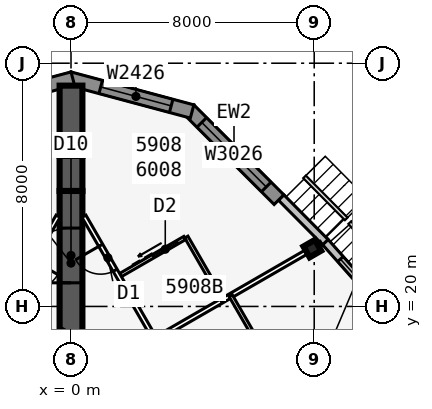
"""IFC4 building model, lengths in metres.
Left out: names, types, materials, properties, quantities, classifications, styles, units other than length and angle.
Written with IfcOpenShell. Run it as: python <this file> out.ifc"""

import sys

from ifc_helpers import new_model, si_unit, direction, frame, frame_2d, origin, origin_2d, place, context, subcontext, project, spatial, polyline, rectangle, i_section, outline, extrude, element, fill, save


model = new_model("IFC4")
c1 = context("Model", 3, precision=1e-05, world=origin(), true_north=direction((0.0, 1.0)))
c2 = subcontext(c1, "Body", "Model", "MODEL_VIEW")
j1 = project(units=[si_unit("LENGTHUNIT", "METRE"), si_unit("PLANEANGLEUNIT", "RADIAN")], contexts=[c1])
p1 = place(None, origin())
s1 = spatial("IfcSite", under=j1, at=p1, CompositionType="ELEMENT")
p2 = place(p1, origin())
s2 = spatial("IfcBuilding", under=s1, at=p2, CompositionType="ELEMENT")
p3 = place(p2, frame((0.0, 0.0, 222.5)))
s3 = spatial("IfcBuildingStorey", under=s2, at=p3, CompositionType="ELEMENT", Elevation=222.5)
p4 = place(p3, frame((16.5, -9.526, 0.0), z_axis=(0.0, 0.0, 1.0), x_axis=(-0.499999749417, 0.866025548458, 0.0)))
e1 = element("IfcWall", 1, at=p4, inside=s3, PredefinedType="SHEAR", context=c2, shape_type="SweptSolid", body=[
    extrude(rectangle(XDim=33.0, YDim=0.75, at=frame_2d((16.5, 0.0))), origin(), (0.0, 0.0, 1.0), 3.6),
])
p5 = place(p4, frame((14.15, 0.0, 0.0)))
e2 = element("IfcOpeningElement", 2, at=p5, cuts=e1, PredefinedType="OPENING", context=c2, shape_type="SweptSolid", body=[
    extrude(rectangle(XDim=1.8, YDim=2.13, at=frame_2d((0.9, 1.065))), frame((0.0, 0.385, 0.0), z_axis=(0.0, -1.0, 0.0), x_axis=(1.0, 0.0, 0.0)), (0.0, 0.0, 1.0), 0.77),
])
p6 = place(p4, frame((12.6, 0.0, 0.0)))
e3 = element("IfcOpeningElement", 3, at=p6, cuts=e1, PredefinedType="OPENING", context=c2, shape_type="SweptSolid", body=[
    extrude(rectangle(XDim=1.0, YDim=2.13, at=frame_2d((0.5, 1.065))), frame((0.0, 0.385, 0.0), z_axis=(0.0, -1.0, 0.0), x_axis=(1.0, 0.0, 0.0)), (0.0, 0.0, 1.0), 0.77),
])
p7 = place(p3, frame((0.0, 19.052, 0.0), z_axis=(0.0, 0.0, 1.0), x_axis=(-0.499999749417, -0.866025548458, 0.0)))
e4 = element("IfcWall", 4, at=p7, inside=s3, PredefinedType="SHEAR", context=c2, shape_type="SweptSolid", body=[
    extrude(rectangle(XDim=33.0, YDim=0.75, at=frame_2d((16.5, 0.0))), origin(), (0.0, 0.0, 1.0), 3.6),
])
p8 = place(p7, frame((14.15, 0.0, 0.0)))
e5 = element("IfcOpeningElement", 5, at=p8, cuts=e4, PredefinedType="OPENING", context=c2, shape_type="SweptSolid", body=[
    extrude(rectangle(XDim=1.8, YDim=2.13, at=frame_2d((0.9, 1.065))), frame((0.0, 0.385, 0.0), z_axis=(0.0, -1.0, 0.0), x_axis=(1.0, 0.0, 0.0)), (0.0, 0.0, 1.0), 0.77),
])
p9 = place(p7, frame((12.6, 0.0, 0.0)))
e6 = element("IfcOpeningElement", 6, at=p9, cuts=e4, PredefinedType="OPENING", context=c2, shape_type="SweptSolid", body=[
    extrude(rectangle(XDim=1.0, YDim=2.13, at=frame_2d((0.5, 1.065))), frame((0.0, 0.385, 0.0), z_axis=(0.0, -1.0, 0.0), x_axis=(1.0, 0.0, 0.0)), (0.0, 0.0, 1.0), 0.77),
])
p10 = place(p3, frame((0.0, 19.052, 0.0), z_axis=(0.0, 0.0, 1.0), x_axis=(0.0, 1.0, 0.0)))
e7 = element("IfcWall", 7, at=p10, inside=s3, PredefinedType="SHEAR", context=c2, shape_type="SweptSolid", body=[
    extrude(rectangle(XDim=4.746, YDim=0.75, at=frame_2d((2.373, 0.0))), origin(), (0.0, 0.0, 1.0), 3.6),
])
p11 = place(p10, frame((1.725, 0.0, 0.0)))
e8 = element("IfcOpeningElement", 8, at=p11, cuts=e7, PredefinedType="OPENING", context=c2, shape_type="SweptSolid", body=[
    extrude(rectangle(XDim=1.8, YDim=2.13, at=frame_2d((0.9, 1.065))), frame((0.0, 0.385, 0.0), z_axis=(0.0, -1.0, 0.0), x_axis=(1.0, 0.0, 0.0)), (0.0, 0.0, 1.0), 0.77),
])
p12 = place(p3, frame((0.0, 23.799, 0.0), z_axis=(0.0, 0.0, 1.0), x_axis=(0.0, 1.0, 0.0)))
e9 = element("IfcWall", 9, at=p12, inside=s3, PredefinedType="SHEAR", context=c2, shape_type="SweptSolid", body=[
    extrude(rectangle(XDim=1.155, YDim=0.75, at=frame_2d((0.577, 0.0))), origin(), (0.0, 0.0, 1.0), 3.6),
])
p13 = place(p3, frame((0.0, 24.953, 0.0), z_axis=(0.0, 0.0, 1.0), x_axis=(0.0, 1.0, 0.0)))
e10 = element("IfcWall", 10, at=p13, inside=s3, PredefinedType="SHEAR", context=c2, shape_type="SweptSolid", body=[
    extrude(rectangle(XDim=2.309, YDim=0.75, at=frame_2d((1.155, 0.0))), origin(), (0.0, 0.0, 1.0), 3.6),
])
p14 = place(p3, frame((7.937, 21.903, 0.0), z_axis=(0.0, 0.0, 1.0), x_axis=(-0.5, 0.866025403784, 0.0)))
e11 = element("IfcColumn", 11, at=p14, inside=s3, PredefinedType="COLUMN", context=c2, shape_type="SweptSolid", body=[
    extrude(i_section(OverallWidth=0.411, OverallDepth=0.434, WebThickness=0.036, FlangeThickness=0.057, at=origin_2d()), origin(), (0.0, 0.0, 1.0), 3.6),
])
p15 = place(p3, frame((11.754, 18.304, 0.0), z_axis=(0.0, 0.0, 1.0), x_axis=(-0.664348996191, 0.747422511876, 0.0)))
e12 = element("IfcWall", 12, at=p15, inside=s3, PredefinedType="STANDARD", context=c2, shape_type="SweptSolid", body=[
    extrude(rectangle(XDim=5.105, YDim=0.25, at=frame_2d((2.552, 0.0))), origin(), (0.0, 0.0, 1.0), 3.435),
])
p16 = place(p15, frame((0.752, 0.0, 0.45)))
e13 = element("IfcOpeningElement", 13, at=p16, cuts=e12, PredefinedType="OPENING", context=c2, shape_type="SweptSolid", body=[
    extrude(rectangle(XDim=3.6, YDim=2.6, at=frame_2d((1.8, 1.3))), frame((0.0, 0.135, 0.0), z_axis=(0.0, -1.0, 0.0), x_axis=(1.0, 0.0, 0.0)), (0.0, 0.0, 1.0), 0.27),
])
p17 = place(p3, frame((8.368, 22.115, 0.0), z_axis=(0.0, 0.0, 1.0), x_axis=(-0.704149946111, 0.710051303352, 0.0)))
e14 = element("IfcWall", 14, at=p17, inside=s3, PredefinedType="STANDARD", context=c2, shape_type="SweptSolid", body=[
    extrude(rectangle(XDim=2.069, YDim=0.25, at=frame_2d((1.034, 0.0))), origin(), (0.0, 0.0, 1.0), 3.435),
])
p18 = place(p3, frame((6.841, 23.512, 0.0), z_axis=(0.0, 0.0, 1.0), x_axis=(-0.707106781187, 0.707106781187, 0.0)))
e15 = element("IfcWall", 15, at=p18, inside=s3, PredefinedType="SOLIDWALL", context=c2, shape_type="SweptSolid", body=[
    extrude(rectangle(XDim=4.184, YDim=0.45, at=frame_2d((2.092, 0.0))), origin(), (0.0, 0.0, 1.0), 3.435),
])
p19 = place(p18, frame((0.592, 0.0, 0.45)))
e16 = element("IfcOpeningElement", 16, at=p19, cuts=e15, PredefinedType="OPENING", context=c2, shape_type="SweptSolid", body=[
    extrude(rectangle(XDim=3.0, YDim=2.6, at=frame_2d((1.5, 1.3))), frame((0.0, 0.235, 0.0), z_axis=(0.0, -1.0, 0.0), x_axis=(1.0, 0.0, 0.0)), (0.0, 0.0, 1.0), 0.47),
])
p20 = place(p3, frame((3.983, 26.413, 0.0), z_axis=(0.0, 0.0, 1.0), x_axis=(-0.965920442324, 0.258839137498, 0.0)))
e17 = element("IfcWall", 17, at=p20, inside=s3, PredefinedType="SOLIDWALL", context=c2, shape_type="SweptSolid", body=[
    extrude(outline(polyline([(4.184, 0.225), (4.124, 0.225), (3.706, 0.113), (3.676, 0.225), (0.0, 0.225), (0.0, -0.225), (4.184, -0.225), (4.184, 0.225)])), origin(), (0.0, 0.0, 1.0), 3.435),
])
p21 = place(p20, frame((0.713, 0.0, 0.45)))
e18 = element("IfcOpeningElement", 18, at=p21, cuts=e17, PredefinedType="OPENING", context=c2, shape_type="SweptSolid", body=[
    extrude(rectangle(XDim=2.4, YDim=2.6, at=frame_2d((1.2, 1.3))), frame((0.0, 0.235, 0.0), z_axis=(0.0, -1.0, 0.0), x_axis=(1.0, 0.0, 0.0)), (0.0, 0.0, 1.0), 0.47),
])
p22 = place(p3, frame((0.058, 27.496, 0.0), z_axis=(0.0, 0.0, 1.0), x_axis=(-0.965920442324, -0.258839137498, 0.0)))
e19 = element("IfcWall", 19, at=p22, inside=s3, PredefinedType="SOLIDWALL", context=c2, shape_type="SweptSolid", body=[
    extrude(outline(polyline([(4.184, 0.225), (0.509, 0.225), (0.479, 0.113), (0.06, 0.225), (0.0, 0.225), (0.0, -0.225), (4.184, -0.225), (4.184, 0.225)])), origin(), (0.0, 0.0, 1.0), 3.435),
])
p23 = place(p22, frame((1.071, 0.0, 0.45)))
e20 = element("IfcOpeningElement", 20, at=p23, cuts=e19, PredefinedType="OPENING", context=c2, shape_type="SweptSolid", body=[
    extrude(rectangle(XDim=2.4, YDim=2.6, at=frame_2d((1.2, 1.3))), frame((0.0, 0.235, 0.0), z_axis=(0.0, -1.0, 0.0), x_axis=(1.0, 0.0, 0.0)), (0.0, 0.0, 1.0), 0.47),
])
p24 = place(p3, frame((20.102, -11.115, 0.0), z_axis=(0.0, 0.0, 1.0), x_axis=(-0.500000265775, 0.866025250339, 0.0)))
e21 = element("IfcWall", 21, at=p24, inside=s3, PredefinedType="PARTITIONING", context=c2, shape_type="SweptSolid", body=[
    extrude(rectangle(XDim=39.354, YDim=0.15, at=frame_2d((19.677, 0.0))), origin(), (0.0, 0.0, 1.0), 3.435),
])
p25 = place(p24, frame((1.102, 0.0, 0.0)))
e22 = element("IfcOpeningElement", 22, at=p25, cuts=e21, PredefinedType="OPENING", context=c2, shape_type="SweptSolid", body=[
    extrude(rectangle(XDim=0.95, YDim=2.13, at=frame_2d((0.475, 1.065))), frame((0.0, 0.085, 0.0), z_axis=(0.0, -1.0, 0.0), x_axis=(1.0, 0.0, 0.0)), (0.0, 0.0, 1.0), 0.17),
])
p26 = place(p24, frame((11.702, 0.0, 0.0)))
e23 = element("IfcOpeningElement", 23, at=p26, cuts=e21, PredefinedType="OPENING", context=c2, shape_type="SweptSolid", body=[
    extrude(rectangle(XDim=0.95, YDim=2.13, at=frame_2d((0.475, 1.065))), frame((0.0, 0.085, 0.0), z_axis=(0.0, -1.0, 0.0), x_axis=(1.0, 0.0, 0.0)), (0.0, 0.0, 1.0), 0.17),
])
p27 = place(p24, frame((26.702, 0.0, 0.0)))
e24 = element("IfcOpeningElement", 24, at=p27, cuts=e21, PredefinedType="OPENING", context=c2, shape_type="SweptSolid", body=[
    extrude(rectangle(XDim=0.95, YDim=2.13, at=frame_2d((0.475, 1.065))), frame((0.0, 0.085, 0.0), z_axis=(0.0, -1.0, 0.0), x_axis=(1.0, 0.0, 0.0)), (0.0, 0.0, 1.0), 0.17),
])
p28 = place(p24, frame((37.302, 0.0, 0.0)))
e25 = element("IfcOpeningElement", 25, at=p28, cuts=e21, PredefinedType="OPENING", context=c2, shape_type="SweptSolid", body=[
    extrude(rectangle(XDim=0.95, YDim=2.13, at=frame_2d((0.475, 1.065))), frame((0.0, 0.085, 0.0), z_axis=(0.0, -1.0, 0.0), x_axis=(1.0, 0.0, 0.0)), (0.0, 0.0, 1.0), 0.17),
])
p29 = place(p3, frame((2.829, 18.954, 0.0), z_axis=(0.0, 0.0, 1.0), x_axis=(0.866026604282, 0.499997920671, 0.0)))
e26 = element("IfcWall", 26, at=p29, inside=s3, PredefinedType="PARTITIONING", context=c2, shape_type="SweptSolid", body=[
    extrude(rectangle(XDim=6.24, YDim=0.15, at=frame_2d((3.12, 0.0))), origin(), (0.0, 0.0, 1.0), 2.589),
])
p30 = place(p3, frame((6.753, 17.755, 0.0), z_axis=(0.0, 0.0, 1.0), x_axis=(-0.499990139034, 0.866031096941, 0.0)))
e27 = element("IfcWall", 27, at=p30, inside=s3, PredefinedType="PLUMBINGWALL", context=c2, shape_type="SweptSolid", body=[
    extrude(rectangle(XDim=3.0, YDim=0.12, at=frame_2d((1.5, 0.0))), origin(), (0.0, 0.0, 1.0), 3.435),
])
p31 = place(p3, frame((4.993, 20.204, 0.0), z_axis=(0.0, 0.0, 1.0), x_axis=(-0.500001309137, 0.866024647952, 0.0)))
e28 = element("IfcWall", 28, at=p31, inside=s3, PredefinedType="PLUMBINGWALL", context=c2, shape_type="SweptSolid", body=[
    extrude(rectangle(XDim=2.4, YDim=0.12, at=frame_2d((1.2, 0.0))), origin(), (0.0, 0.0, 1.0), 3.435),
])
p32 = place(p3, frame((1.628, 21.032, 0.0), z_axis=(0.0, 0.0, 1.0), x_axis=(0.866048967903, 0.499959183527, 0.0)))
e29 = element("IfcWall", 29, at=p32, inside=s3, PredefinedType="PLUMBINGWALL", context=c2, shape_type="SweptSolid", body=[
    extrude(rectangle(XDim=2.44, YDim=0.12, at=frame_2d((1.22, 0.0))), origin(), (0.0, 0.0, 1.0), 3.435),
])
p33 = place(p32, frame((1.25, 0.0, 0.0)))
e30 = element("IfcOpeningElement", 30, at=p33, cuts=e29, PredefinedType="OPENING", context=c2, shape_type="SweptSolid", body=[
    extrude(rectangle(XDim=0.9, YDim=2.13, at=frame_2d((0.45, 1.065))), frame((0.0, 0.07, 0.0), z_axis=(0.0, -1.0, 0.0), x_axis=(1.0, 0.0, 0.0)), (0.0, 0.0, 1.0), 0.14),
])
p34 = place(p3, frame((-0.425, 22.966, 0.0), z_axis=(0.0, 0.0, 1.0), x_axis=(-0.500000265775, -0.866025250339, 0.0)))
e31 = element("IfcWall", 31, at=p34, inside=s3, PredefinedType="PARTITIONING", context=c2, shape_type="SweptSolid", body=[
    extrude(rectangle(XDim=39.354, YDim=0.15, at=frame_2d((19.677, 0.0))), origin(), (0.0, 0.0, 1.0), 3.435),
])
p35 = place(p34, frame((1.665, 0.0, 0.0)))
e32 = element("IfcOpeningElement", 32, at=p35, cuts=e31, PredefinedType="OPENING", context=c2, shape_type="SweptSolid", body=[
    extrude(rectangle(XDim=0.95, YDim=2.13, at=frame_2d((0.475, 1.065))), frame((0.0, 0.085, 0.0), z_axis=(0.0, -1.0, 0.0), x_axis=(1.0, 0.0, 0.0)), (0.0, 0.0, 1.0), 0.17),
])
p36 = place(p34, frame((11.702, 0.0, 0.0)))
e33 = element("IfcOpeningElement", 33, at=p36, cuts=e31, PredefinedType="OPENING", context=c2, shape_type="SweptSolid", body=[
    extrude(rectangle(XDim=0.95, YDim=2.13, at=frame_2d((0.475, 1.065))), frame((0.0, 0.085, 0.0), z_axis=(0.0, -1.0, 0.0), x_axis=(1.0, 0.0, 0.0)), (0.0, 0.0, 1.0), 0.17),
])
p37 = place(p34, frame((21.702, 0.0, 0.0)))
e34 = element("IfcOpeningElement", 34, at=p37, cuts=e31, PredefinedType="OPENING", context=c2, shape_type="SweptSolid", body=[
    extrude(rectangle(XDim=0.95, YDim=2.13, at=frame_2d((0.475, 1.065))), frame((0.0, 0.085, 0.0), z_axis=(0.0, -1.0, 0.0), x_axis=(1.0, 0.0, 0.0)), (0.0, 0.0, 1.0), 0.17),
])
p38 = place(p34, frame((36.739, 0.0, 0.0)))
e35 = element("IfcOpeningElement", 35, at=p38, cuts=e31, PredefinedType="OPENING", context=c2, shape_type="SweptSolid", body=[
    extrude(rectangle(XDim=0.95, YDim=2.13, at=frame_2d((0.475, 1.065))), frame((0.0, 0.085, 0.0), z_axis=(0.0, -1.0, 0.0), x_axis=(1.0, 0.0, 0.0)), (0.0, 0.0, 1.0), 0.17),
])
p39 = place(p16, origin())
e36 = element("IfcWindow", 36, at=p39, inside=s3, PartitioningType="SINGLE_PANEL", PredefinedType="WINDOW", context=c2, shape_type="SweptSolid", body=[
    extrude(rectangle(XDim=3.6, YDim=2.6, at=frame_2d((1.8, 1.3))), frame((0.0, 0.03, 0.0), z_axis=(0.0, -1.0, 0.0), x_axis=(1.0, 0.0, 0.0)), (0.0, 0.0, 1.0), 0.06),
])
fill(e13, e36)
p40 = place(p19, origin())
e37 = element("IfcWindow", 37, at=p40, inside=s3, PartitioningType="SINGLE_PANEL", PredefinedType="WINDOW", context=c2, shape_type="SweptSolid", body=[
    extrude(rectangle(XDim=3.0, YDim=2.6, at=frame_2d((1.5, 1.3))), frame((0.0, 0.03, 0.0), z_axis=(0.0, -1.0, 0.0), x_axis=(1.0, 0.0, 0.0)), (0.0, 0.0, 1.0), 0.06),
])
fill(e16, e37)
p41 = place(p21, origin())
e38 = element("IfcWindow", 38, at=p41, inside=s3, PartitioningType="SINGLE_PANEL", PredefinedType="WINDOW", context=c2, shape_type="SweptSolid", body=[
    extrude(rectangle(XDim=2.4, YDim=2.6, at=frame_2d((1.2, 1.3))), frame((0.0, 0.03, 0.0), z_axis=(0.0, -1.0, 0.0), x_axis=(1.0, 0.0, 0.0)), (0.0, 0.0, 1.0), 0.06),
])
fill(e18, e38)
p42 = place(p33, origin())
e39 = element("IfcDoor", 39, at=p42, inside=s3, OperationType="SLIDING_TO_LEFT", PredefinedType="DOOR", context=c2, shape_type="SweptSolid", body=[
    extrude(rectangle(XDim=0.9, YDim=2.13, at=frame_2d((0.45, 1.065))), frame((0.0, 0.025, 0.0), z_axis=(0.0, -1.0, 0.0), x_axis=(1.0, 0.0, 0.0)), (0.0, 0.0, 1.0), 0.05),
])
fill(e30, e39)
p43 = place(p28, origin())
e40 = element("IfcDoor", 40, at=p43, inside=s3, OperationType="SINGLE_SWING_RIGHT", PredefinedType="DOOR", context=c2, shape_type="SweptSolid", body=[
    extrude(rectangle(XDim=0.95, YDim=2.13, at=frame_2d((0.475, 1.065))), frame((0.0, 0.025, 0.0), z_axis=(0.0, -1.0, 0.0), x_axis=(1.0, 0.0, 0.0)), (0.0, 0.0, 1.0), 0.05),
])
fill(e25, e40)
p44 = place(p11, origin())
e41 = element("IfcDoor", 41, at=p44, inside=s3, OperationType="DOUBLE_DOOR_DOUBLE_SWING", PredefinedType="DOOR", context=c2, shape_type="SweptSolid", body=[
    extrude(rectangle(XDim=1.8, YDim=2.13, at=frame_2d((0.9, 1.065))), frame((0.0, 0.025, 0.0), z_axis=(0.0, -1.0, 0.0), x_axis=(1.0, 0.0, 0.0)), (0.0, 0.0, 1.0), 0.05),
])
fill(e8, e41)
save(model, sys.argv[1])
